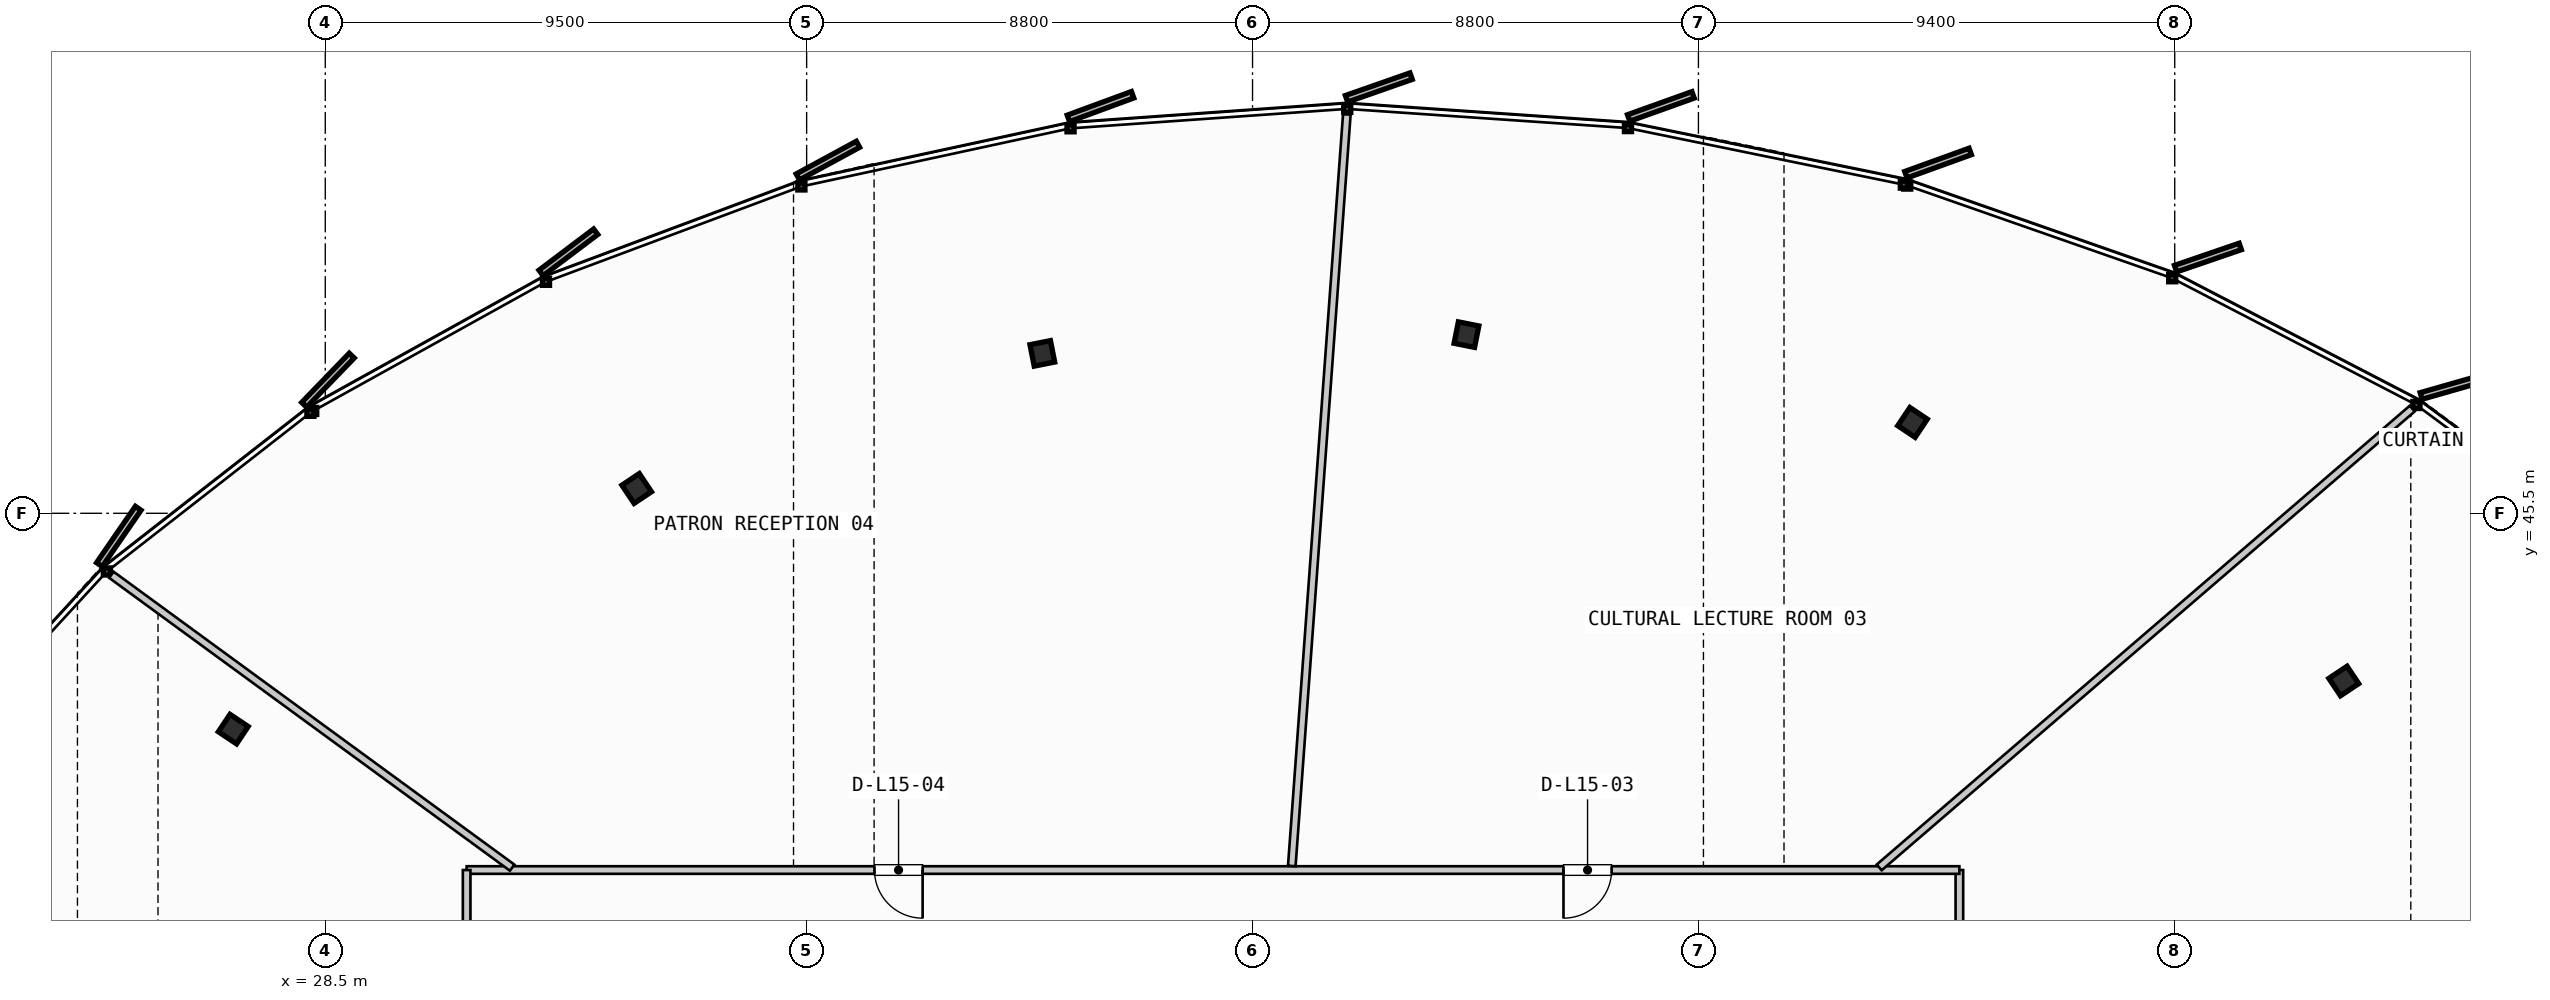
"""IFC4 building model, lengths in metres.
Left out: names, types, materials, properties, quantities, classifications, styles, units other than length and angle.
Written with IfcOpenShell. Run it as: python <this file> out.ifc"""

import sys

from ifc_helpers import new_model, si_unit, direction, frame, frame_2d, origin, origin_2d, place, context, subcontext, project, spatial, rectangle, i_section, extrude, source, transform, mapped, element, fill, save


model = new_model("IFC4")
c1 = context("Model", 3, precision=1e-05, world=origin(), true_north=direction((0.0, 1.0)))
c2 = subcontext(c1, "Body", "Model", "MODEL_VIEW")
j1 = project(units=[si_unit("LENGTHUNIT", "METRE"), si_unit("PLANEANGLEUNIT", "RADIAN")], contexts=[c1])
p1 = place(None, origin())
s1 = spatial("IfcSite", under=j1, at=p1, CompositionType="ELEMENT")
p2 = place(p1, origin())
s2 = spatial("IfcBuilding", under=s1, at=p2, CompositionType="ELEMENT")
p3 = place(p2, frame((0.0, 0.0, 63.8)))
s3 = spatial("IfcBuildingStorey", under=s2, at=p3, CompositionType="ELEMENT", Elevation=63.8)
m1 = source(origin(), c2, "Body", "SweptSolid", [
    extrude(i_section(OverallWidth=0.412, OverallDepth=0.431, WebThickness=0.042, FlangeThickness=0.068, FilletRadius=0.015, at=origin_2d()), origin(), (0.0, 0.0, 1.0), 3.55),
])
for number, where, z_axis, x_axis in (
    (1, (68.336, 42.19, 0.0), (0.0, 0.0, 1.0), (0.831, 0.556, 0.0)),
    (2, (59.825, 47.293, 0.0), (0.0, 0.0, 1.0), (0.556, 0.831, 0.0)),
    (3, (51.022, 49.026, 0.0), (0.0, 0.0, 1.0), (0.195, 0.981, 0.0)),
    (4, (42.652, 48.656, 0.0), (0.0, 0.0, 1.0), (-0.195, 0.981, 0.0)),
    (5, (34.646, 45.99, 0.0), (0.0, 0.0, 1.0), (-0.556, 0.831, 0.0)),
    (6, (26.685, 41.241, 0.0), (0.0, 0.0, 1.0), (-0.831, 0.556, 0.0)),
):
    element("IfcColumn", number, at=place(p3, frame(where, z_axis=z_axis, x_axis=x_axis)), inside=s3, PredefinedType="COLUMN", context=c2, shape_type="MappedRepresentation", body=[
        mapped(m1, transform((0.0, 0.0, 0.0), scale=1.0)),
    ])
p4 = place(p3, frame((60.75, 17.14, 0.0), z_axis=(0.0, 0.0, 1.0), x_axis=(0.0, 1.0, 0.0)))
e7 = element("IfcWall", 7, at=p4, inside=s3, PredefinedType="PARTITIONING", context=c2, shape_type="SweptSolid", body=[
    extrude(rectangle(XDim=21.32, YDim=0.15, at=frame_2d((10.66, 0.0))), origin(), (0.0, 0.0, 1.0), 2.505),
])
p5 = place(p4, frame((12.003, 0.0, 0.0)))
e8 = element("IfcOpeningElement", 8, at=p5, cuts=e7, PredefinedType="OPENING", context=c2, shape_type="SweptSolid", body=[
    extrude(rectangle(XDim=0.95, YDim=2.15, at=frame_2d((0.475, 1.075))), frame((0.0, 0.085, 0.0), z_axis=(0.0, -1.0, 0.0), x_axis=(1.0, 0.0, 0.0)), (0.0, 0.0, 1.0), 0.17),
])
p6 = place(p3, frame((60.75, 38.46, 0.0), z_axis=(0.0, 0.0, 1.0), x_axis=(-1.0, 0.0, 0.0)))
e9 = element("IfcWall", 9, at=p6, inside=s3, PredefinedType="PARTITIONING", context=c2, shape_type="SweptSolid", body=[
    extrude(rectangle(XDim=29.46, YDim=0.15, at=frame_2d((14.73, 0.0))), origin(), (0.0, 0.0, 1.0), 2.505),
])
p7 = place(p6, frame((6.863, 0.0, 0.0)))
e10 = element("IfcOpeningElement", 10, at=p7, cuts=e9, PredefinedType="OPENING", context=c2, shape_type="SweptSolid", body=[
    extrude(rectangle(XDim=0.95, YDim=2.15, at=frame_2d((0.475, 1.075))), frame((0.0, 0.085, 0.0), z_axis=(0.0, -1.0, 0.0), x_axis=(1.0, 0.0, 0.0)), (0.0, 0.0, 1.0), 0.17),
])
p8 = place(p6, frame((20.461, 0.0, 0.0)))
e11 = element("IfcOpeningElement", 11, at=p8, cuts=e9, PredefinedType="OPENING", context=c2, shape_type="SweptSolid", body=[
    extrude(rectangle(XDim=0.95, YDim=2.15, at=frame_2d((0.475, 1.075))), frame((0.0, 0.085, 0.0), z_axis=(0.0, -1.0, 0.0), x_axis=(1.0, 0.0, 0.0)), (0.0, 0.0, 1.0), 0.17),
])
p9 = place(p3, frame((31.29, 38.46, 0.0), z_axis=(0.0, 0.0, 1.0), x_axis=(0.0, -1.0, 0.0)))
e12 = element("IfcWall", 12, at=p9, inside=s3, PredefinedType="PARTITIONING", context=c2, shape_type="SweptSolid", body=[
    extrude(rectangle(XDim=21.32, YDim=0.15, at=frame_2d((10.66, 0.0))), origin(), (0.0, 0.0, 1.0), 2.505),
])
p10 = place(p9, frame((10.185, 0.0, 0.0)))
e13 = element("IfcOpeningElement", 13, at=p10, cuts=e12, PredefinedType="OPENING", context=c2, shape_type="SweptSolid", body=[
    extrude(rectangle(XDim=0.95, YDim=2.15, at=frame_2d((0.475, 1.075))), frame((0.0, 0.085, 0.0), z_axis=(0.0, -1.0, 0.0), x_axis=(1.0, 0.0, 0.0)), (0.0, 0.0, 1.0), 0.17),
])
p11 = place(p3, frame((59.168, 38.512, 0.0), z_axis=(0.0, 0.0, 1.0), x_axis=(0.757930170229, 0.652335693533, 0.0)))
e14 = element("IfcWall", 14, at=p11, inside=s3, PredefinedType="PARTITIONING", context=c2, shape_type="SweptSolid", body=[
    extrude(rectangle(XDim=13.879, YDim=0.15, at=frame_2d((6.94, 0.0))), origin(), (0.0, 0.0, 1.0), 2.505),
])
p12 = place(p3, frame((47.575, 38.54, 0.0), z_axis=(0.0, 0.0, 1.0), x_axis=(0.073040160703, 0.997329000343, 0.0)))
e15 = element("IfcWall", 15, at=p12, inside=s3, PredefinedType="PARTITIONING", context=c2, shape_type="SweptSolid", body=[
    extrude(rectangle(XDim=14.871, YDim=0.15, at=frame_2d((7.436, 0.0))), origin(), (0.0, 0.0, 1.0), 2.505),
])
p13 = place(p3, frame((32.188, 38.507, 0.0), z_axis=(0.0, 0.0, 1.0), x_axis=(-0.807411670148, 0.589988470149, 0.0)))
e16 = element("IfcWall", 16, at=p13, inside=s3, PredefinedType="PARTITIONING", context=c2, shape_type="SweptSolid", body=[
    extrude(rectangle(XDim=9.796, YDim=0.15, at=frame_2d((4.898, 0.0))), origin(), (0.0, 0.0, 1.0), 2.505),
])
m2 = source(origin(), c2, "Body", "SweptSolid", [
    extrude(rectangle(XDim=0.95, YDim=2.15, at=frame_2d((0.475, 1.075))), frame((0.0, 0.025, 0.0), z_axis=(0.0, -1.0, 0.0), x_axis=(1.0, 0.0, 0.0)), (0.0, 0.0, 1.0), 0.05),
])
p14 = place(p7, origin())
e17 = element("IfcDoor", 17, at=p14, inside=s3, OperationType="SINGLE_SWING_RIGHT", PredefinedType="DOOR", context=c2, shape_type="MappedRepresentation", body=[
    mapped(m2, transform((0.0, 0.0, 0.0), scale=1.0)),
])
fill(e10, e17)
p15 = place(p8, origin())
e18 = element("IfcDoor", 18, at=p15, inside=s3, OperationType="SINGLE_SWING_LEFT", PredefinedType="DOOR", context=c2, shape_type="MappedRepresentation", body=[
    mapped(m2, transform((0.0, 0.0, 0.0), scale=1.0)),
])
fill(e11, e18)
save(model, sys.argv[1])
